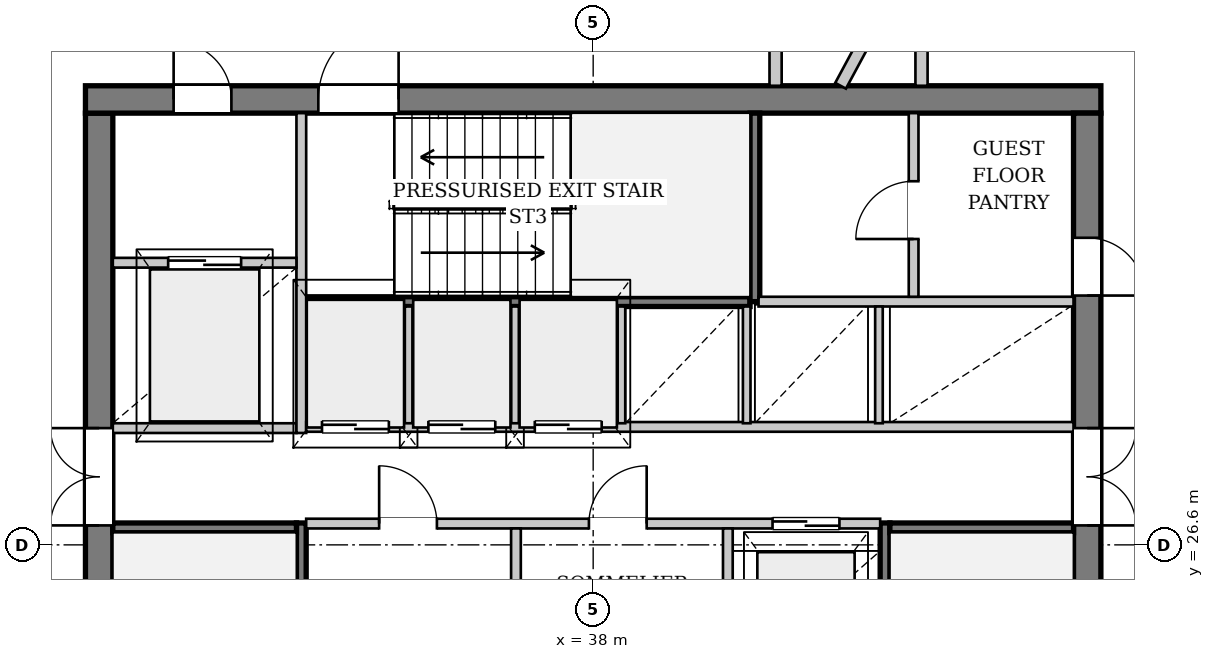
"""IFC4 building model, lengths in metres.
Left out: names, types, materials, properties, quantities, classifications, styles, units other than length and angle.
Written with IfcOpenShell. Run it as: python <this file> out.ifc"""

import sys

from ifc_helpers import new_model, si_unit, direction, frame, frame_2d, origin, place, context, subcontext, project, spatial, rectangle, extrude, source, transform, mapped, element, fill, save


model = new_model("IFC4")
c1 = context("Model", 3, precision=1e-05, world=origin(), true_north=direction((0.0, 1.0)))
c2 = subcontext(c1, "Body", "Model", "MODEL_VIEW")
j1 = project(units=[si_unit("LENGTHUNIT", "METRE"), si_unit("PLANEANGLEUNIT", "RADIAN")], contexts=[c1])
p1 = place(None, origin())
s1 = spatial("IfcSite", under=j1, at=p1, CompositionType="ELEMENT")
p2 = place(p1, origin())
s2 = spatial("IfcBuilding", under=s1, at=p2, CompositionType="ELEMENT")
p3 = place(p2, frame((0.0, 0.0, 248.9)))
s3 = spatial("IfcBuildingStorey", under=s2, at=p3, CompositionType="ELEMENT", Elevation=248.9)
p4 = place(p3, frame((15.584, 28.637, 0.0), z_axis=(0.0, 0.0, 1.0), x_axis=(0.838692120157, 0.544605846083, 0.0)))
e1 = element("IfcWall", 1, at=p4, inside=s3, PredefinedType="SOLIDWALL", context=c2, shape_type="SweptSolid", body=[
    extrude(rectangle(XDim=22.124, YDim=0.38, at=frame_2d((11.062, 0.0))), origin(), (0.0, 0.0, 1.0), 2.872),
])
p5 = place(p4, frame((5.595, 0.0, 0.65)))
e2 = element("IfcOpeningElement", 2, at=p5, cuts=e1, PredefinedType="OPENING", context=c2, shape_type="SweptSolid", body=[
    extrude(rectangle(XDim=1.2, YDim=1.5, at=frame_2d((0.6, 0.75))), frame((0.0, 0.2, 0.0), z_axis=(0.0, -1.0, 0.0), x_axis=(1.0, 0.0, 0.0)), (0.0, 0.0, 1.0), 0.4),
])
p6 = place(p4, frame((16.929, 0.0, 0.65)))
e3 = element("IfcOpeningElement", 3, at=p6, cuts=e1, PredefinedType="OPENING", context=c2, shape_type="SweptSolid", body=[
    extrude(rectangle(XDim=1.2, YDim=1.5, at=frame_2d((0.6, 0.75))), frame((0.0, 0.2, 0.0), z_axis=(0.0, -1.0, 0.0), x_axis=(1.0, 0.0, 0.0)), (0.0, 0.0, 1.0), 0.4),
])
p7 = place(p3, frame((29.875, 19.5, 0.0), z_axis=(0.0, 0.0, 1.0), x_axis=(0.0, 1.0, 0.0)))
e4 = element("IfcWall", 4, at=p7, inside=s3, PredefinedType="SHEAR", context=c2, shape_type="SweptSolid", body=[
    extrude(rectangle(XDim=14.2, YDim=0.45, at=frame_2d((7.1, 0.0))), origin(), (0.0, 0.0, 1.0), 3.38),
])
p8 = place(p7, frame((7.42, 0.0, 0.0)))
e5 = element("IfcOpeningElement", 5, at=p8, cuts=e4, PredefinedType="OPENING", context=c2, shape_type="SweptSolid", body=[
    extrude(rectangle(XDim=1.6, YDim=2.2, at=frame_2d((0.8, 1.1))), frame((0.0, 0.235, 0.0), z_axis=(0.0, -1.0, 0.0), x_axis=(1.0, 0.0, 0.0)), (0.0, 0.0, 1.0), 0.47),
])
p9 = place(p3, frame((29.65, 33.925, 0.0), z_axis=(0.0, 0.0, 1.0), x_axis=(1.0, 0.0, 0.0)))
e6 = element("IfcWall", 6, at=p9, inside=s3, PredefinedType="SHEAR", context=c2, shape_type="SweptSolid", body=[
    extrude(rectangle(XDim=16.7, YDim=0.45, at=frame_2d((8.35, 0.0))), origin(), (0.0, 0.0, 1.0), 3.38),
])
p10 = place(p9, frame((1.45, 0.0, 0.0)))
e7 = element("IfcOpeningElement", 7, at=p10, cuts=e6, PredefinedType="OPENING", context=c2, shape_type="SweptSolid", body=[
    extrude(rectangle(XDim=0.95, YDim=2.1, at=frame_2d((0.475, 1.05))), frame((0.0, 0.235, 0.0), z_axis=(0.0, -1.0, 0.0), x_axis=(1.0, 0.0, 0.0)), (0.0, 0.0, 1.0), 0.47),
])
p11 = place(p9, frame((3.83, 0.0, 0.0)))
e8 = element("IfcOpeningElement", 8, at=p11, cuts=e6, PredefinedType="OPENING", context=c2, shape_type="SweptSolid", body=[
    extrude(rectangle(XDim=1.32, YDim=2.2, at=frame_2d((0.66, 1.1))), frame((0.0, 0.235, 0.0), z_axis=(0.0, -1.0, 0.0), x_axis=(1.0, 0.0, 0.0)), (0.0, 0.0, 1.0), 0.47),
])
p12 = place(p3, frame((46.125, 33.7, 0.0), z_axis=(0.0, 0.0, 1.0), x_axis=(0.0, -1.0, 0.0)))
e9 = element("IfcWall", 9, at=p12, inside=s3, PredefinedType="SHEAR", context=c2, shape_type="SweptSolid", body=[
    extrude(rectangle(XDim=14.2, YDim=0.45, at=frame_2d((7.1, 0.0))), origin(), (0.0, 0.0, 1.0), 3.38),
])
p13 = place(p12, frame((5.18, 0.0, 0.0)))
e10 = element("IfcOpeningElement", 10, at=p13, cuts=e9, PredefinedType="OPENING", context=c2, shape_type="SweptSolid", body=[
    extrude(rectangle(XDim=1.6, YDim=2.2, at=frame_2d((0.8, 1.1))), frame((0.0, 0.235, 0.0), z_axis=(0.0, -1.0, 0.0), x_axis=(1.0, 0.0, 0.0)), (0.0, 0.0, 1.0), 0.47),
])
p14 = place(p12, frame((2.05, 0.0, 0.0)))
e11 = element("IfcOpeningElement", 11, at=p14, cuts=e9, PredefinedType="OPENING", context=c2, shape_type="SweptSolid", body=[
    extrude(rectangle(XDim=0.95, YDim=2.1, at=frame_2d((0.475, 1.05))), frame((0.0, 0.235, 0.0), z_axis=(0.0, -1.0, 0.0), x_axis=(1.0, 0.0, 0.0)), (0.0, 0.0, 1.0), 0.47),
])
p15 = place(p3, frame((33.2, 19.5, 0.0), z_axis=(0.0, 0.0, 1.0), x_axis=(0.0, 1.0, 0.0)))
e12 = element("IfcWall", 12, at=p15, inside=s3, PredefinedType="PARTITIONING", context=c2, shape_type="SweptSolid", body=[
    extrude(rectangle(XDim=7.46, YDim=0.16, at=frame_2d((3.73, 0.0))), origin(), (0.0, 0.0, 1.0), 3.38),
])
p16 = place(p15, frame((0.08, 0.0, 0.0)))
e13 = element("IfcOpeningElement", 13, at=p16, cuts=e12, PredefinedType="OPENING", context=c2, shape_type="SweptSolid", body=[
    extrude(rectangle(XDim=1.32, YDim=2.2, at=frame_2d((0.66, 1.1))), frame((0.0, 0.09, 0.0), z_axis=(0.0, -1.0, 0.0), x_axis=(1.0, 0.0, 0.0)), (0.0, 0.0, 1.0), 0.18),
])
p17 = place(p3, frame((30.1, 26.88, 0.0), z_axis=(0.0, 0.0, 1.0), x_axis=(1.0, 0.0, 0.0)))
e14 = element("IfcWall", 14, at=p17, inside=s3, PredefinedType="PARTITIONING", context=c2, shape_type="SweptSolid", body=[
    extrude(rectangle(XDim=3.02, YDim=0.16, at=frame_2d((1.51, 0.0))), origin(), (0.0, 0.0, 1.0), 3.38),
])
p18 = place(p3, frame((42.8, 26.96, 0.0), z_axis=(0.0, 0.0, 1.0), x_axis=(0.0, -1.0, 0.0)))
e15 = element("IfcWall", 15, at=p18, inside=s3, PredefinedType="PARTITIONING", context=c2, shape_type="SweptSolid", body=[
    extrude(rectangle(XDim=7.46, YDim=0.16, at=frame_2d((3.73, 0.0))), origin(), (0.0, 0.0, 1.0), 3.38),
])
p19 = place(p18, frame((6.06, 0.0, 0.0)))
e16 = element("IfcOpeningElement", 16, at=p19, cuts=e15, PredefinedType="OPENING", context=c2, shape_type="SweptSolid", body=[
    extrude(rectangle(XDim=1.32, YDim=2.2, at=frame_2d((0.66, 1.1))), frame((0.0, 0.09, 0.0), z_axis=(0.0, -1.0, 0.0), x_axis=(1.0, 0.0, 0.0)), (0.0, 0.0, 1.0), 0.18),
])
p20 = place(p3, frame((42.88, 26.88, 0.0), z_axis=(0.0, 0.0, 1.0), x_axis=(1.0, 0.0, 0.0)))
e17 = element("IfcWall", 17, at=p20, inside=s3, PredefinedType="PARTITIONING", context=c2, shape_type="SweptSolid", body=[
    extrude(rectangle(XDim=3.02, YDim=0.16, at=frame_2d((1.51, 0.0))), origin(), (0.0, 0.0, 1.0), 3.38),
])
p21 = place(p3, frame((33.28, 30.6, 0.0), z_axis=(0.0, 0.0, 1.0), x_axis=(1.0, 0.0, 0.0)))
e18 = element("IfcWall", 18, at=p21, inside=s3, PredefinedType="PARTITIONING", context=c2, shape_type="SweptSolid", body=[
    extrude(rectangle(XDim=7.3, YDim=0.16, at=frame_2d((3.65, 0.0))), origin(), (0.0, 0.0, 1.0), 3.38),
])
p22 = place(p3, frame((40.66, 30.6, 0.0), z_axis=(0.0, 0.0, 1.0), x_axis=(0.0, 1.0, 0.0)))
e19 = element("IfcWall", 19, at=p22, inside=s3, PredefinedType="PARTITIONING", context=c2, shape_type="SweptSolid", body=[
    extrude(rectangle(XDim=3.1, YDim=0.16, at=frame_2d((1.55, 0.0))), origin(), (0.0, 0.0, 1.0), 3.38),
])
p23 = place(p3, frame((30.1, 28.52, 0.0), z_axis=(0.0, 0.0, 1.0), x_axis=(1.0, 0.0, 0.0)))
e20 = element("IfcWall", 20, at=p23, inside=s3, PredefinedType="PARTITIONING", context=c2, shape_type="SweptSolid", body=[
    extrude(rectangle(XDim=3.02, YDim=0.16, at=frame_2d((1.51, 0.0))), origin(), (0.0, 0.0, 1.0), 3.38),
])
p24 = place(p3, frame((33.2, 28.44, 0.0), z_axis=(0.0, 0.0, 1.0), x_axis=(0.0, 1.0, 0.0)))
e21 = element("IfcWall", 21, at=p24, inside=s3, PredefinedType="PARTITIONING", context=c2, shape_type="SweptSolid", body=[
    extrude(rectangle(XDim=5.26, YDim=0.16, at=frame_2d((2.63, 0.0))), origin(), (0.0, 0.0, 1.0), 3.38),
])
p25 = place(p3, frame((30.1, 31.24, 0.0), z_axis=(0.0, 0.0, 1.0), x_axis=(1.0, 0.0, 0.0)))
e22 = element("IfcWall", 22, at=p25, inside=s3, PredefinedType="PARTITIONING", context=c2, shape_type="SweptSolid", body=[
    extrude(rectangle(XDim=3.02, YDim=0.16, at=frame_2d((1.51, 0.0))), origin(), (0.0, 0.0, 1.0), 3.38),
])
p26 = place(p25, frame((0.91, 0.0, 0.0)))
e23 = element("IfcOpeningElement", 23, at=p26, cuts=e22, PredefinedType="OPENING", context=c2, shape_type="SweptSolid", body=[
    extrude(rectangle(XDim=1.2, YDim=2.2, at=frame_2d((0.6, 1.1))), frame((0.0, 0.09, 0.0), z_axis=(0.0, -1.0, 0.0), x_axis=(1.0, 0.0, 0.0)), (0.0, 0.0, 1.0), 0.18),
])
p27 = place(p3, frame((33.28, 26.95, 0.0), z_axis=(0.0, 0.0, 1.0), x_axis=(1.0, 0.0, 0.0)))
e24 = element("IfcWall", 24, at=p27, inside=s3, PredefinedType="PARTITIONING", context=c2, shape_type="SweptSolid", body=[
    extrude(rectangle(XDim=9.44, YDim=0.16, at=frame_2d((4.72, 0.0))), origin(), (0.0, 0.0, 1.0), 3.38),
])
p28 = place(p27, frame((1.2, 0.0, 0.0)))
e25 = element("IfcOpeningElement", 25, at=p28, cuts=e24, PredefinedType="OPENING", context=c2, shape_type="SweptSolid", body=[
    extrude(rectangle(XDim=0.95, YDim=2.1, at=frame_2d((0.475, 1.05))), frame((0.0, 0.09, 0.0), z_axis=(0.0, -1.0, 0.0), x_axis=(1.0, 0.0, 0.0)), (0.0, 0.0, 1.0), 0.18),
])
p29 = place(p27, frame((4.65, 0.0, 0.0)))
e26 = element("IfcOpeningElement", 26, at=p29, cuts=e24, PredefinedType="OPENING", context=c2, shape_type="SweptSolid", body=[
    extrude(rectangle(XDim=0.95, YDim=2.1, at=frame_2d((0.475, 1.05))), frame((0.0, 0.09, 0.0), z_axis=(0.0, -1.0, 0.0), x_axis=(1.0, 0.0, 0.0)), (0.0, 0.0, 1.0), 0.18),
])
p30 = place(p27, frame((7.67, 0.0, 0.0)))
e27 = element("IfcOpeningElement", 27, at=p30, cuts=e24, PredefinedType="OPENING", context=c2, shape_type="SweptSolid", body=[
    extrude(rectangle(XDim=1.1, YDim=2.2, at=frame_2d((0.55, 1.1))), frame((0.0, 0.09, 0.0), z_axis=(0.0, -1.0, 0.0), x_axis=(1.0, 0.0, 0.0)), (0.0, 0.0, 1.0), 0.18),
])
for number, where, z_axis, x_axis in (
    (28, (36.73, 24.56, 0.0), (0.0, 0.0, 1.0), (0.0, 1.0, 0.0)),
    (29, (40.215, 24.56, 0.0), (0.0, 0.0, 1.0), (0.0, 1.0, 0.0)),
):
    element("IfcWall", number, at=place(p3, frame(where, z_axis=z_axis, x_axis=x_axis)), inside=s3, PredefinedType="PARTITIONING", context=c2, shape_type="SweptSolid", body=[
        extrude(rectangle(XDim=2.31, YDim=0.16, at=frame_2d((1.155, 0.0))), origin(), (0.0, 0.0, 1.0), 3.38),
    ])
p31 = place(p3, frame((33.28, 28.54, 0.0), z_axis=(0.0, 0.0, 1.0), x_axis=(1.0, 0.0, 0.0)))
e30 = element("IfcWall", 30, at=p31, inside=s3, PredefinedType="PARTITIONING", context=c2, shape_type="SweptSolid", body=[
    extrude(rectangle(XDim=12.62, YDim=0.16, at=frame_2d((6.31, 0.0))), origin(), (0.0, 0.0, 1.0), 3.38),
])
p32 = place(p31, frame((0.26, 0.0, 0.0)))
e31 = element("IfcOpeningElement", 31, at=p32, cuts=e30, PredefinedType="OPENING", context=c2, shape_type="SweptSolid", body=[
    extrude(rectangle(XDim=1.1, YDim=2.2, at=frame_2d((0.55, 1.1))), frame((0.0, 0.09, 0.0), z_axis=(0.0, -1.0, 0.0), x_axis=(1.0, 0.0, 0.0)), (0.0, 0.0, 1.0), 0.18),
])
p33 = place(p31, frame((2.01, 0.0, 0.0)))
e32 = element("IfcOpeningElement", 32, at=p33, cuts=e30, PredefinedType="OPENING", context=c2, shape_type="SweptSolid", body=[
    extrude(rectangle(XDim=1.1, YDim=2.2, at=frame_2d((0.55, 1.1))), frame((0.0, 0.09, 0.0), z_axis=(0.0, -1.0, 0.0), x_axis=(1.0, 0.0, 0.0)), (0.0, 0.0, 1.0), 0.18),
])
p34 = place(p31, frame((3.76, 0.0, 0.0)))
e33 = element("IfcOpeningElement", 33, at=p34, cuts=e30, PredefinedType="OPENING", context=c2, shape_type="SweptSolid", body=[
    extrude(rectangle(XDim=1.1, YDim=2.2, at=frame_2d((0.55, 1.1))), frame((0.0, 0.09, 0.0), z_axis=(0.0, -1.0, 0.0), x_axis=(1.0, 0.0, 0.0)), (0.0, 0.0, 1.0), 0.18),
])
p35 = place(p3, frame((40.72, 30.6, 0.0), z_axis=(0.0, 0.0, 1.0), x_axis=(1.0, 0.0, 0.0)))
e34 = element("IfcWall", 34, at=p35, inside=s3, PredefinedType="PARTITIONING", context=c2, shape_type="SweptSolid", body=[
    extrude(rectangle(XDim=5.18, YDim=0.16, at=frame_2d((2.59, 0.0))), origin(), (0.0, 0.0, 1.0), 3.38),
])
for number, where, z_axis, x_axis in (
    (35, (34.965, 28.6, 0.0), (0.0, 0.0, 1.0), (0.0, 1.0, 0.0)),
    (36, (36.715, 28.6, 0.0), (0.0, 0.0, 1.0), (0.0, 1.0, 0.0)),
    (37, (38.465, 28.6, 0.0), (0.0, 0.0, 1.0), (0.0, 1.0, 0.0)),
    (38, (40.525, 28.6, 0.0), (0.0, 0.0, 1.0), (0.0, 1.0, 0.0)),
    (39, (42.7, 28.6, 0.0), (0.0, 0.0, 1.0), (0.0, 1.0, 0.0)),
):
    element("IfcWall", number, at=place(p3, frame(where, z_axis=z_axis, x_axis=x_axis)), inside=s3, PredefinedType="PARTITIONING", context=c2, shape_type="SweptSolid", body=[
        extrude(rectangle(XDim=1.92, YDim=0.125, at=frame_2d((0.96, 0.0))), origin(), (0.0, 0.0, 1.0), 3.38),
    ])
p36 = place(p3, frame((43.27, 30.68, 0.0), z_axis=(0.0, 0.0, 1.0), x_axis=(0.0, 1.0, 0.0)))
e40 = element("IfcWall", 40, at=p36, inside=s3, PredefinedType="PARTITIONING", context=c2, shape_type="SweptSolid", body=[
    extrude(rectangle(XDim=3.02, YDim=0.16, at=frame_2d((1.51, 0.0))), origin(), (0.0, 0.0, 1.0), 3.38),
])
p37 = place(p36, frame((0.95, 0.0, 0.0)))
e41 = element("IfcOpeningElement", 41, at=p37, cuts=e40, PredefinedType="OPENING", context=c2, shape_type="SweptSolid", body=[
    extrude(rectangle(XDim=0.95, YDim=2.1, at=frame_2d((0.475, 1.05))), frame((0.0, 0.09, 0.0), z_axis=(0.0, -1.0, 0.0), x_axis=(1.0, 0.0, 0.0)), (0.0, 0.0, 1.0), 0.18),
])
p38 = place(p3, frame((42.069, 34.15, 0.0), z_axis=(0.0, 0.0, 1.0), x_axis=(0.474411767959, 0.880303058283, 0.0)))
e42 = element("IfcWall", 42, at=p38, inside=s3, PredefinedType="PARTITIONING", context=c2, shape_type="SweptSolid", body=[
    extrude(rectangle(XDim=14.84, YDim=0.2, at=frame_2d((7.42, 0.0))), origin(), (0.0, 0.0, 1.0), 3.38),
])
for number, where, z_axis, x_axis in (
    (43, (41.0, 34.15, 0.0), (0.0, 0.0, 1.0), (0.0, 1.0, 0.0)),
    (44, (43.4, 34.15, 0.0), (0.0, 0.0, 1.0), (0.0, 1.0, 0.0)),
):
    element("IfcWall", number, at=place(p3, frame(where, z_axis=z_axis, x_axis=x_axis)), inside=s3, PredefinedType="PARTITIONING", context=c2, shape_type="SweptSolid", body=[
        extrude(rectangle(XDim=1.85, YDim=0.2, at=frame_2d((0.925, 0.0))), origin(), (0.0, 0.0, 1.0), 3.38),
    ])
m1 = source(origin(), c2, "Body", "SweptSolid", [
    extrude(rectangle(XDim=1.6, YDim=2.2, at=frame_2d((0.8, 1.1))), frame((0.0, 0.025, 0.0), z_axis=(0.0, -1.0, 0.0), x_axis=(1.0, 0.0, 0.0)), (0.0, 0.0, 1.0), 0.05),
])
p39 = place(p8, origin())
e45 = element("IfcDoor", 45, at=p39, inside=s3, OperationType="DOUBLE_DOOR_SINGLE_SWING", PredefinedType="DOOR", context=c2, shape_type="MappedRepresentation", body=[
    mapped(m1, transform((0.0, 0.0, 0.0), x_axis=(1.0, 0.0, 0.0), y_axis=(0.0, 1.0, 0.0), z_axis=(0.0, 0.0, 1.0), scale=1.0)),
])
fill(e5, e45)
m2 = source(origin(), c2, "Body", "SweptSolid", [
    extrude(rectangle(XDim=0.95, YDim=2.1, at=frame_2d((0.475, 1.05))), frame((0.0, 0.025, 0.0), z_axis=(0.0, -1.0, 0.0), x_axis=(1.0, 0.0, 0.0)), (0.0, 0.0, 1.0), 0.05),
])
p40 = place(p10, origin())
e46 = element("IfcDoor", 46, at=p40, inside=s3, OperationType="SINGLE_SWING_LEFT", PredefinedType="DOOR", context=c2, shape_type="MappedRepresentation", body=[
    mapped(m2, transform((0.0, 0.0, 0.0), x_axis=(1.0, 0.0, 0.0), y_axis=(0.0, 1.0, 0.0), z_axis=(0.0, 0.0, 1.0), scale=1.0)),
])
fill(e7, e46)
m3 = source(origin(), c2, "Body", "SweptSolid", [
    extrude(rectangle(XDim=1.32, YDim=2.2, at=frame_2d((0.66, 1.1))), frame((0.0, 0.025, 0.0), z_axis=(0.0, -1.0, 0.0), x_axis=(1.0, 0.0, 0.0)), (0.0, 0.0, 1.0), 0.05),
])
p41 = place(p11, origin())
e47 = element("IfcDoor", 47, at=p41, inside=s3, OperationType="SINGLE_SWING_RIGHT", PredefinedType="DOOR", context=c2, shape_type="MappedRepresentation", body=[
    mapped(m3, transform((0.0, 0.0, 0.0), x_axis=(1.0, 0.0, 0.0), y_axis=(0.0, 1.0, 0.0), z_axis=(0.0, 0.0, 1.0), scale=1.0)),
])
fill(e8, e47)
p42 = place(p13, origin())
e48 = element("IfcDoor", 48, at=p42, inside=s3, OperationType="DOUBLE_DOOR_SINGLE_SWING", PredefinedType="DOOR", context=c2, shape_type="MappedRepresentation", body=[
    mapped(m1, transform((0.0, 0.0, 0.0), x_axis=(1.0, 0.0, 0.0), y_axis=(0.0, 1.0, 0.0), z_axis=(0.0, 0.0, 1.0), scale=1.0)),
])
fill(e10, e48)
m4 = source(origin(), c2, "Body", "SweptSolid", [
    extrude(rectangle(XDim=1.2, YDim=2.2, at=frame_2d((0.6, 1.1))), frame((0.0, 0.025, 0.0), z_axis=(0.0, -1.0, 0.0), x_axis=(1.0, 0.0, 0.0)), (0.0, 0.0, 1.0), 0.05),
])
p43 = place(p26, origin())
e49 = element("IfcDoor", 49, at=p43, inside=s3, OperationType="DOUBLE_DOOR_SLIDING", PredefinedType="DOOR", context=c2, shape_type="MappedRepresentation", body=[
    mapped(m4, transform((0.0, 0.0, 0.0), x_axis=(1.0, 0.0, 0.0), y_axis=(0.0, 1.0, 0.0), z_axis=(0.0, 0.0, 1.0), scale=1.0)),
])
fill(e23, e49)
p44 = place(p28, origin())
e50 = element("IfcDoor", 50, at=p44, inside=s3, OperationType="SINGLE_SWING_LEFT", PredefinedType="DOOR", context=c2, shape_type="MappedRepresentation", body=[
    mapped(m2, transform((0.0, 0.0, 0.0), x_axis=(1.0, 0.0, 0.0), y_axis=(0.0, 1.0, 0.0), z_axis=(0.0, 0.0, 1.0), scale=1.0)),
])
fill(e25, e50)
p45 = place(p29, origin())
e51 = element("IfcDoor", 51, at=p45, inside=s3, OperationType="SINGLE_SWING_RIGHT", PredefinedType="DOOR", context=c2, shape_type="MappedRepresentation", body=[
    mapped(m2, transform((0.0, 0.0, 0.0), x_axis=(1.0, 0.0, 0.0), y_axis=(0.0, 1.0, 0.0), z_axis=(0.0, 0.0, 1.0), scale=1.0)),
])
fill(e26, e51)
m5 = source(origin(), c2, "Body", "SweptSolid", [
    extrude(rectangle(XDim=1.1, YDim=2.2, at=frame_2d((0.55, 1.1))), frame((0.0, 0.025, 0.0), z_axis=(0.0, -1.0, 0.0), x_axis=(1.0, 0.0, 0.0)), (0.0, 0.0, 1.0), 0.05),
])
p46 = place(p30, origin())
e52 = element("IfcDoor", 52, at=p46, inside=s3, OperationType="DOUBLE_DOOR_SLIDING", PredefinedType="DOOR", context=c2, shape_type="MappedRepresentation", body=[
    mapped(m5, transform((0.0, 0.0, 0.0), x_axis=(1.0, 0.0, 0.0), y_axis=(0.0, 1.0, 0.0), z_axis=(0.0, 0.0, 1.0), scale=1.0)),
])
fill(e27, e52)
p47 = place(p32, origin())
e53 = element("IfcDoor", 53, at=p47, inside=s3, OperationType="DOUBLE_DOOR_SLIDING", PredefinedType="DOOR", context=c2, shape_type="MappedRepresentation", body=[
    mapped(m5, transform((0.0, 0.0, 0.0), x_axis=(1.0, 0.0, 0.0), y_axis=(0.0, 1.0, 0.0), z_axis=(0.0, 0.0, 1.0), scale=1.0)),
])
fill(e31, e53)
p48 = place(p33, origin())
e54 = element("IfcDoor", 54, at=p48, inside=s3, OperationType="DOUBLE_DOOR_SLIDING", PredefinedType="DOOR", context=c2, shape_type="MappedRepresentation", body=[
    mapped(m5, transform((0.0, 0.0, 0.0), x_axis=(1.0, 0.0, 0.0), y_axis=(0.0, 1.0, 0.0), z_axis=(0.0, 0.0, 1.0), scale=1.0)),
])
fill(e32, e54)
p49 = place(p34, origin())
e55 = element("IfcDoor", 55, at=p49, inside=s3, OperationType="DOUBLE_DOOR_SLIDING", PredefinedType="DOOR", context=c2, shape_type="MappedRepresentation", body=[
    mapped(m5, transform((0.0, 0.0, 0.0), x_axis=(1.0, 0.0, 0.0), y_axis=(0.0, 1.0, 0.0), z_axis=(0.0, 0.0, 1.0), scale=1.0)),
])
fill(e33, e55)
p50 = place(p37, origin())
e56 = element("IfcDoor", 56, at=p50, inside=s3, OperationType="SINGLE_SWING_LEFT", PredefinedType="DOOR", context=c2, shape_type="MappedRepresentation", body=[
    mapped(m2, transform((0.0, 0.0, 0.0), x_axis=(1.0, 0.0, 0.0), y_axis=(0.0, 1.0, 0.0), z_axis=(0.0, 0.0, 1.0), scale=1.0)),
])
fill(e41, e56)
p51 = place(p14, origin())
e57 = element("IfcDoor", 57, at=p51, inside=s3, OperationType="SINGLE_SWING_RIGHT", PredefinedType="DOOR", context=c2, shape_type="MappedRepresentation", body=[
    mapped(m2, transform((0.0, 0.0, 0.0), x_axis=(1.0, 0.0, 0.0), y_axis=(0.0, 1.0, 0.0), z_axis=(0.0, 0.0, 1.0), scale=1.0)),
])
fill(e11, e57)
save(model, sys.argv[1])
